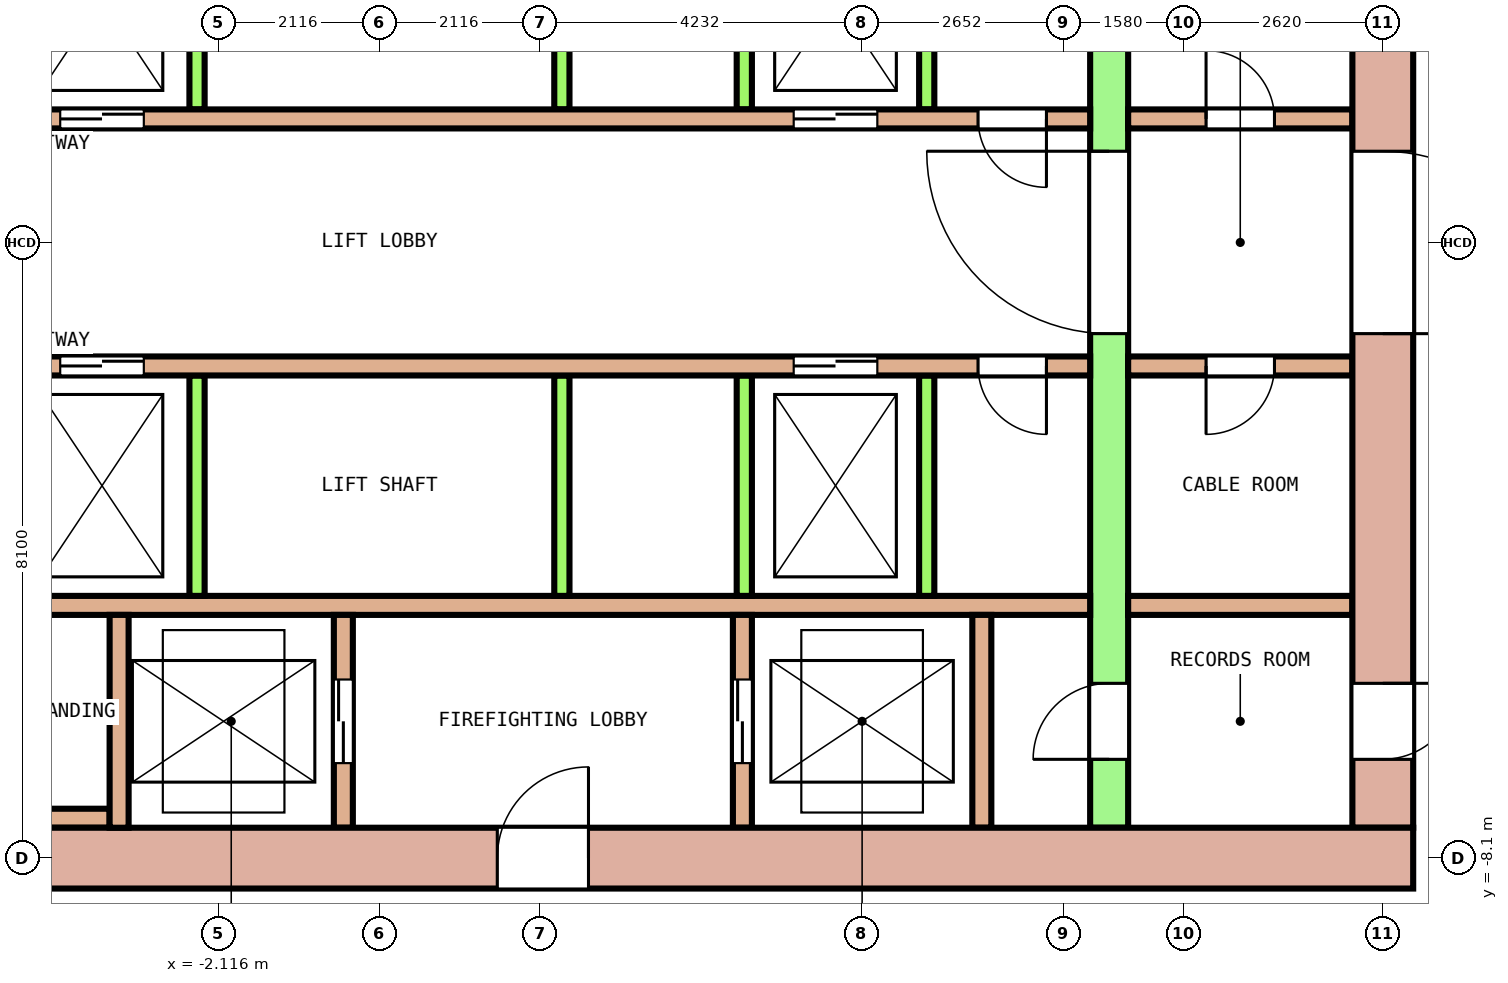
"""IFC4 building model, lengths in metres.
Left out: names, types, materials, properties, quantities, classifications, styles, units other than length and angle.
Written with IfcOpenShell. Run it as: python <this file> out.ifc"""

import sys

from ifc_helpers import new_model, si_unit, direction, frame, frame_2d, origin, place, context, subcontext, project, spatial, rectangle, extrude, element, fill, save


model = new_model("IFC4")
c1 = context("Model", 3, precision=1e-05, world=origin(), true_north=direction((0.0, 1.0)))
c2 = subcontext(c1, "Body", "Model", "MODEL_VIEW")
j1 = project(units=[si_unit("LENGTHUNIT", "METRE"), si_unit("PLANEANGLEUNIT", "RADIAN")], contexts=[c1])
p1 = place(None, origin())
s1 = spatial("IfcSite", under=j1, at=p1, CompositionType="ELEMENT")
p2 = place(p1, origin())
s2 = spatial("IfcBuilding", under=s1, at=p2, CompositionType="ELEMENT")
p3 = place(p2, frame((0.0, 0.0, 135.2)))
s3 = spatial("IfcBuildingStorey", under=s2, at=p3, CompositionType="ELEMENT", Elevation=135.2)
p4 = place(p3, frame((-13.6, -8.1, 0.0), z_axis=(0.0, 0.0, 1.0), x_axis=(1.0, 0.0, 0.0)))
e1 = element("IfcWall", 1, at=p4, inside=s3, PredefinedType="SHEAR", context=c2, shape_type="SweptSolid", body=[
    extrude(rectangle(XDim=27.2, YDim=0.8, at=frame_2d((13.6, 0.0))), origin(), (0.0, 0.0, 1.0), 4.1),
])
p5 = place(p4, frame((15.15, 0.0, 0.0)))
e2 = element("IfcOpeningElement", 2, at=p5, cuts=e1, PredefinedType="OPENING", context=c2, shape_type="SweptSolid", body=[
    extrude(rectangle(XDim=1.2, YDim=2.1, at=frame_2d((0.6, 1.05))), frame((0.0, 0.41, 0.0), z_axis=(0.0, -1.0, 0.0), x_axis=(1.0, 0.0, 0.0)), (0.0, 0.0, 1.0), 0.82),
])
p6 = place(p3, frame((13.2, -7.7, 0.0), z_axis=(0.0, 0.0, 1.0), x_axis=(0.0, 1.0, 0.0)))
e3 = element("IfcWall", 3, at=p6, inside=s3, PredefinedType="SHEAR", context=c2, shape_type="SweptSolid", body=[
    extrude(rectangle(XDim=15.4, YDim=0.8, at=frame_2d((7.7, 0.0))), origin(), (0.0, 0.0, 1.0), 4.1),
])
p7 = place(p6, frame((6.5, 0.0, 0.0)))
e4 = element("IfcOpeningElement", 4, at=p7, cuts=e3, PredefinedType="OPENING", context=c2, shape_type="SweptSolid", body=[
    extrude(rectangle(XDim=2.4, YDim=2.1, at=frame_2d((1.2, 1.05))), frame((0.0, 0.41, 0.0), z_axis=(0.0, -1.0, 0.0), x_axis=(1.0, 0.0, 0.0)), (0.0, 0.0, 1.0), 0.82),
])
p8 = place(p6, frame((13.4, 0.0, 0.0)))
e5 = element("IfcOpeningElement", 5, at=p8, cuts=e3, PredefinedType="OPENING", context=c2, shape_type="SweptSolid", body=[
    extrude(rectangle(XDim=1.2, YDim=2.1, at=frame_2d((0.6, 1.05))), frame((0.0, 0.41, 0.0), z_axis=(0.0, -1.0, 0.0), x_axis=(1.0, 0.0, 0.0)), (0.0, 0.0, 1.0), 0.82),
])
p9 = place(p6, frame((0.9, 0.0, 0.0)))
e6 = element("IfcOpeningElement", 6, at=p9, cuts=e3, PredefinedType="OPENING", context=c2, shape_type="SweptSolid", body=[
    extrude(rectangle(XDim=1.0, YDim=2.1, at=frame_2d((0.5, 1.05))), frame((0.0, 0.41, 0.0), z_axis=(0.0, -1.0, 0.0), x_axis=(1.0, 0.0, 0.0)), (0.0, 0.0, 1.0), 0.82),
])
p10 = place(p3, frame((9.6, -7.7, 0.0), z_axis=(0.0, 0.0, 1.0), x_axis=(0.0, 1.0, 0.0)))
e7 = element("IfcWall", 7, at=p10, inside=s3, PredefinedType="SHEAR", context=c2, shape_type="SweptSolid", body=[
    extrude(rectangle(XDim=15.4, YDim=0.5, at=frame_2d((7.7, 0.0))), origin(), (0.0, 0.0, 1.0), 4.1),
])
p11 = place(p10, frame((6.5, 0.0, 0.0)))
e8 = element("IfcOpeningElement", 8, at=p11, cuts=e7, PredefinedType="OPENING", context=c2, shape_type="SweptSolid", body=[
    extrude(rectangle(XDim=2.4, YDim=2.1, at=frame_2d((1.2, 1.05))), frame((0.0, 0.26, 0.0), z_axis=(0.0, -1.0, 0.0), x_axis=(1.0, 0.0, 0.0)), (0.0, 0.0, 1.0), 0.52),
])
p12 = place(p10, frame((13.4, 0.0, 0.0)))
e9 = element("IfcOpeningElement", 9, at=p12, cuts=e7, PredefinedType="OPENING", context=c2, shape_type="SweptSolid", body=[
    extrude(rectangle(XDim=1.2, YDim=2.1, at=frame_2d((0.6, 1.05))), frame((0.0, 0.26, 0.0), z_axis=(0.0, -1.0, 0.0), x_axis=(1.0, 0.0, 0.0)), (0.0, 0.0, 1.0), 0.52),
])
p13 = place(p10, frame((0.9, 0.0, 0.0)))
e10 = element("IfcOpeningElement", 10, at=p13, cuts=e7, PredefinedType="OPENING", context=c2, shape_type="SweptSolid", body=[
    extrude(rectangle(XDim=1.0, YDim=2.1, at=frame_2d((0.5, 1.05))), frame((0.0, 0.26, 0.0), z_axis=(0.0, -1.0, 0.0), x_axis=(1.0, 0.0, 0.0)), (0.0, 0.0, 1.0), 0.52),
])
p14 = place(p3, frame((-9.35, 1.625, 0.0), z_axis=(0.0, 0.0, 1.0), x_axis=(1.0, 0.0, 0.0)))
e11 = element("IfcWall", 11, at=p14, inside=s3, PredefinedType="SOLIDWALL", context=c2, shape_type="SweptSolid", body=[
    extrude(rectangle(XDim=18.7, YDim=0.25, at=frame_2d((9.35, 0.0))), origin(), (0.0, 0.0, 1.0), 4.1),
])
p15 = place(p14, frame((2.85, 0.0, 0.0)))
e12 = element("IfcOpeningElement", 12, at=p15, cuts=e11, PredefinedType="OPENING", context=c2, shape_type="SweptSolid", body=[
    extrude(rectangle(XDim=1.1, YDim=2.1, at=frame_2d((0.55, 1.05))), frame((0.0, 0.135, 0.0), z_axis=(0.0, -1.0, 0.0), x_axis=(1.0, 0.0, 0.0)), (0.0, 0.0, 1.0), 0.27),
])
p16 = place(p14, frame((5.15, 0.0, 0.0)))
e13 = element("IfcOpeningElement", 13, at=p16, cuts=e11, PredefinedType="OPENING", context=c2, shape_type="SweptSolid", body=[
    extrude(rectangle(XDim=1.1, YDim=2.1, at=frame_2d((0.55, 1.05))), frame((0.0, 0.135, 0.0), z_axis=(0.0, -1.0, 0.0), x_axis=(1.0, 0.0, 0.0)), (0.0, 0.0, 1.0), 0.27),
])
p17 = place(p14, frame((14.8, 0.0, 0.0)))
e14 = element("IfcOpeningElement", 14, at=p17, cuts=e11, PredefinedType="OPENING", context=c2, shape_type="SweptSolid", body=[
    extrude(rectangle(XDim=1.1, YDim=2.1, at=frame_2d((0.55, 1.05))), frame((0.0, 0.135, 0.0), z_axis=(0.0, -1.0, 0.0), x_axis=(1.0, 0.0, 0.0)), (0.0, 0.0, 1.0), 0.27),
])
p18 = place(p14, frame((0.575, 0.0, 0.0)))
e15 = element("IfcOpeningElement", 15, at=p18, cuts=e11, PredefinedType="OPENING", context=c2, shape_type="SweptSolid", body=[
    extrude(rectangle(XDim=0.9, YDim=2.1, at=frame_2d((0.45, 1.05))), frame((0.0, 0.135, 0.0), z_axis=(0.0, -1.0, 0.0), x_axis=(1.0, 0.0, 0.0)), (0.0, 0.0, 1.0), 0.27),
])
p19 = place(p14, frame((17.225, 0.0, 0.0)))
e16 = element("IfcOpeningElement", 16, at=p19, cuts=e11, PredefinedType="OPENING", context=c2, shape_type="SweptSolid", body=[
    extrude(rectangle(XDim=0.9, YDim=2.1, at=frame_2d((0.45, 1.05))), frame((0.0, 0.135, 0.0), z_axis=(0.0, -1.0, 0.0), x_axis=(1.0, 0.0, 0.0)), (0.0, 0.0, 1.0), 0.27),
])
p20 = place(p3, frame((9.85, 1.625, 0.0), z_axis=(0.0, 0.0, 1.0), x_axis=(1.0, 0.0, 0.0)))
e17 = element("IfcWall", 17, at=p20, inside=s3, PredefinedType="SOLIDWALL", context=c2, shape_type="SweptSolid", body=[
    extrude(rectangle(XDim=2.95, YDim=0.25, at=frame_2d((1.475, 0.0))), origin(), (0.0, 0.0, 1.0), 4.1),
])
p21 = place(p20, frame((1.025, 0.0, 0.0)))
e18 = element("IfcOpeningElement", 18, at=p21, cuts=e17, PredefinedType="OPENING", context=c2, shape_type="SweptSolid", body=[
    extrude(rectangle(XDim=0.9, YDim=2.1, at=frame_2d((0.45, 1.05))), frame((0.0, 0.135, 0.0), z_axis=(0.0, -1.0, 0.0), x_axis=(1.0, 0.0, 0.0)), (0.0, 0.0, 1.0), 0.27),
])
for number, where, z_axis, x_axis in (
    (19, (-2.4, 1.75, 0.0), (0.0, 0.0, 1.0), (0.0, 1.0, 0.0)),
    (20, (2.4, 1.75, 0.0), (0.0, 0.0, 1.0), (0.0, 1.0, 0.0)),
    (21, (4.8, 1.75, 0.0), (0.0, 0.0, 1.0), (0.0, 1.0, 0.0)),
    (22, (7.2, 1.75, 0.0), (0.0, 0.0, 1.0), (0.0, 1.0, 0.0)),
):
    element("IfcWall", number, at=place(p3, frame(where, z_axis=z_axis, x_axis=x_axis)), inside=s3, PredefinedType="SOLIDWALL", context=c2, shape_type="SweptSolid", body=[
        extrude(rectangle(XDim=2.9, YDim=0.2, at=frame_2d((1.45, 0.0))), origin(), (0.0, 0.0, 1.0), 4.1),
    ])
p22 = place(p3, frame((-9.35, -1.625, 0.0), z_axis=(0.0, 0.0, 1.0), x_axis=(1.0, 0.0, 0.0)))
e23 = element("IfcWall", 23, at=p22, inside=s3, PredefinedType="SOLIDWALL", context=c2, shape_type="SweptSolid", body=[
    extrude(rectangle(XDim=18.7, YDim=0.25, at=frame_2d((9.35, 0.0))), origin(), (0.0, 0.0, 1.0), 4.1),
])
p23 = place(p22, frame((2.85, 0.0, 0.0)))
e24 = element("IfcOpeningElement", 24, at=p23, cuts=e23, PredefinedType="OPENING", context=c2, shape_type="SweptSolid", body=[
    extrude(rectangle(XDim=1.1, YDim=2.1, at=frame_2d((0.55, 1.05))), frame((0.0, 0.135, 0.0), z_axis=(0.0, -1.0, 0.0), x_axis=(1.0, 0.0, 0.0)), (0.0, 0.0, 1.0), 0.27),
])
p24 = place(p22, frame((5.15, 0.0, 0.0)))
e25 = element("IfcOpeningElement", 25, at=p24, cuts=e23, PredefinedType="OPENING", context=c2, shape_type="SweptSolid", body=[
    extrude(rectangle(XDim=1.1, YDim=2.1, at=frame_2d((0.55, 1.05))), frame((0.0, 0.135, 0.0), z_axis=(0.0, -1.0, 0.0), x_axis=(1.0, 0.0, 0.0)), (0.0, 0.0, 1.0), 0.27),
])
p25 = place(p22, frame((14.8, 0.0, 0.0)))
e26 = element("IfcOpeningElement", 26, at=p25, cuts=e23, PredefinedType="OPENING", context=c2, shape_type="SweptSolid", body=[
    extrude(rectangle(XDim=1.1, YDim=2.1, at=frame_2d((0.55, 1.05))), frame((0.0, 0.135, 0.0), z_axis=(0.0, -1.0, 0.0), x_axis=(1.0, 0.0, 0.0)), (0.0, 0.0, 1.0), 0.27),
])
p26 = place(p22, frame((0.575, 0.0, 0.0)))
e27 = element("IfcOpeningElement", 27, at=p26, cuts=e23, PredefinedType="OPENING", context=c2, shape_type="SweptSolid", body=[
    extrude(rectangle(XDim=0.9, YDim=2.1, at=frame_2d((0.45, 1.05))), frame((0.0, 0.135, 0.0), z_axis=(0.0, -1.0, 0.0), x_axis=(1.0, 0.0, 0.0)), (0.0, 0.0, 1.0), 0.27),
])
p27 = place(p22, frame((17.225, 0.0, 0.0)))
e28 = element("IfcOpeningElement", 28, at=p27, cuts=e23, PredefinedType="OPENING", context=c2, shape_type="SweptSolid", body=[
    extrude(rectangle(XDim=0.9, YDim=2.1, at=frame_2d((0.45, 1.05))), frame((0.0, 0.135, 0.0), z_axis=(0.0, -1.0, 0.0), x_axis=(1.0, 0.0, 0.0)), (0.0, 0.0, 1.0), 0.27),
])
p28 = place(p3, frame((9.85, -1.625, 0.0), z_axis=(0.0, 0.0, 1.0), x_axis=(1.0, 0.0, 0.0)))
e29 = element("IfcWall", 29, at=p28, inside=s3, PredefinedType="SOLIDWALL", context=c2, shape_type="SweptSolid", body=[
    extrude(rectangle(XDim=2.95, YDim=0.25, at=frame_2d((1.475, 0.0))), origin(), (0.0, 0.0, 1.0), 4.1),
])
p29 = place(p28, frame((1.025, 0.0, 0.0)))
e30 = element("IfcOpeningElement", 30, at=p29, cuts=e29, PredefinedType="OPENING", context=c2, shape_type="SweptSolid", body=[
    extrude(rectangle(XDim=0.9, YDim=2.1, at=frame_2d((0.45, 1.05))), frame((0.0, 0.135, 0.0), z_axis=(0.0, -1.0, 0.0), x_axis=(1.0, 0.0, 0.0)), (0.0, 0.0, 1.0), 0.27),
])
p30 = place(p3, frame((-9.35, -4.775, 0.0), z_axis=(0.0, 0.0, 1.0), x_axis=(1.0, 0.0, 0.0)))
e31 = element("IfcWall", 31, at=p30, inside=s3, PredefinedType="SOLIDWALL", context=c2, shape_type="SweptSolid", body=[
    extrude(rectangle(XDim=18.7, YDim=0.25, at=frame_2d((9.35, 0.0))), origin(), (0.0, 0.0, 1.0), 4.1),
])
p31 = place(p3, frame((9.85, -4.775, 0.0), z_axis=(0.0, 0.0, 1.0), x_axis=(1.0, 0.0, 0.0)))
e32 = element("IfcWall", 32, at=p31, inside=s3, PredefinedType="SOLIDWALL", context=c2, shape_type="SweptSolid", body=[
    extrude(rectangle(XDim=2.95, YDim=0.25, at=frame_2d((1.475, 0.0))), origin(), (0.0, 0.0, 1.0), 4.1),
])
for number, where, z_axis, x_axis in (
    (33, (-2.4, -4.65, 0.0), (0.0, 0.0, 1.0), (0.0, 1.0, 0.0)),
    (34, (2.4, -4.65, 0.0), (0.0, 0.0, 1.0), (0.0, 1.0, 0.0)),
    (35, (4.8, -4.65, 0.0), (0.0, 0.0, 1.0), (0.0, 1.0, 0.0)),
    (36, (7.2, -4.65, 0.0), (0.0, 0.0, 1.0), (0.0, 1.0, 0.0)),
):
    element("IfcWall", number, at=place(p3, frame(where, z_axis=z_axis, x_axis=x_axis)), inside=s3, PredefinedType="SOLIDWALL", context=c2, shape_type="SweptSolid", body=[
        extrude(rectangle(XDim=2.9, YDim=0.2, at=frame_2d((1.45, 0.0))), origin(), (0.0, 0.0, 1.0), 4.1),
    ])
p32 = place(p3, frame((-9.35, -7.575, 0.0), z_axis=(0.0, 0.0, 1.0), x_axis=(1.0, 0.0, 0.0)))
e37 = element("IfcWall", 37, at=p32, inside=s3, PredefinedType="SOLIDWALL", context=c2, shape_type="SweptSolid", body=[
    extrude(rectangle(XDim=5.8, YDim=0.25, at=frame_2d((2.9, 0.0))), origin(), (0.0, 0.0, 1.0), 4.1),
])
p33 = place(p3, frame((-3.425, -7.7, 0.0), z_axis=(0.0, 0.0, 1.0), x_axis=(0.0, 1.0, 0.0)))
e38 = element("IfcWall", 38, at=p33, inside=s3, PredefinedType="SOLIDWALL", context=c2, shape_type="SweptSolid", body=[
    extrude(rectangle(XDim=2.8, YDim=0.25, at=frame_2d((1.4, 0.0))), origin(), (0.0, 0.0, 1.0), 4.1),
])
p34 = place(p3, frame((-0.475, -7.7, 0.0), z_axis=(0.0, 0.0, 1.0), x_axis=(0.0, 1.0, 0.0)))
e39 = element("IfcWall", 39, at=p34, inside=s3, PredefinedType="SOLIDWALL", context=c2, shape_type="SweptSolid", body=[
    extrude(rectangle(XDim=2.8, YDim=0.25, at=frame_2d((1.4, 0.0))), origin(), (0.0, 0.0, 1.0), 4.1),
])
p35 = place(p34, frame((0.85, 0.0, 0.0)))
e40 = element("IfcOpeningElement", 40, at=p35, cuts=e39, PredefinedType="OPENING", context=c2, shape_type="SweptSolid", body=[
    extrude(rectangle(XDim=1.1, YDim=2.1, at=frame_2d((0.55, 1.05))), frame((0.0, 0.135, 0.0), z_axis=(0.0, -1.0, 0.0), x_axis=(1.0, 0.0, 0.0)), (0.0, 0.0, 1.0), 0.27),
])
p36 = place(p3, frame((4.775, -7.7, 0.0), z_axis=(0.0, 0.0, 1.0), x_axis=(0.0, 1.0, 0.0)))
e41 = element("IfcWall", 41, at=p36, inside=s3, PredefinedType="SOLIDWALL", context=c2, shape_type="SweptSolid", body=[
    extrude(rectangle(XDim=2.8, YDim=0.25, at=frame_2d((1.4, 0.0))), origin(), (0.0, 0.0, 1.0), 4.1),
])
p37 = place(p36, frame((0.85, 0.0, 0.0)))
e42 = element("IfcOpeningElement", 42, at=p37, cuts=e41, PredefinedType="OPENING", context=c2, shape_type="SweptSolid", body=[
    extrude(rectangle(XDim=1.1, YDim=2.1, at=frame_2d((0.55, 1.05))), frame((0.0, 0.135, 0.0), z_axis=(0.0, -1.0, 0.0), x_axis=(1.0, 0.0, 0.0)), (0.0, 0.0, 1.0), 0.27),
])
p38 = place(p3, frame((7.925, -7.7, 0.0), z_axis=(0.0, 0.0, 1.0), x_axis=(0.0, 1.0, 0.0)))
e43 = element("IfcWall", 43, at=p38, inside=s3, PredefinedType="SOLIDWALL", context=c2, shape_type="SweptSolid", body=[
    extrude(rectangle(XDim=2.8, YDim=0.25, at=frame_2d((1.4, 0.0))), origin(), (0.0, 0.0, 1.0), 4.1),
])
p39 = place(p16, origin())
e44 = element("IfcDoor", 44, at=p39, inside=s3, OperationType="DOUBLE_DOOR_SLIDING", PredefinedType="DOOR", context=c2, shape_type="SweptSolid", body=[
    extrude(rectangle(XDim=1.1, YDim=2.1, at=frame_2d((0.55, 1.05))), frame((0.0, 0.075, 0.0), z_axis=(0.0, -1.0, 0.0), x_axis=(1.0, 0.0, 0.0)), (0.0, 0.0, 1.0), 0.15),
])
fill(e13, e44)
p40 = place(p17, origin())
e45 = element("IfcDoor", 45, at=p40, inside=s3, OperationType="DOUBLE_DOOR_SLIDING", PredefinedType="DOOR", context=c2, shape_type="SweptSolid", body=[
    extrude(rectangle(XDim=1.1, YDim=2.1, at=frame_2d((0.55, 1.05))), frame((0.0, 0.075, 0.0), z_axis=(0.0, -1.0, 0.0), x_axis=(1.0, 0.0, 0.0)), (0.0, 0.0, 1.0), 0.15),
])
fill(e14, e45)
p41 = place(p24, origin())
e46 = element("IfcDoor", 46, at=p41, inside=s3, OperationType="DOUBLE_DOOR_SLIDING", PredefinedType="DOOR", context=c2, shape_type="SweptSolid", body=[
    extrude(rectangle(XDim=1.1, YDim=2.1, at=frame_2d((0.55, 1.05))), frame((0.0, 0.075, 0.0), z_axis=(0.0, -1.0, 0.0), x_axis=(1.0, 0.0, 0.0)), (0.0, 0.0, 1.0), 0.15),
])
fill(e25, e46)
p42 = place(p25, origin())
e47 = element("IfcDoor", 47, at=p42, inside=s3, OperationType="DOUBLE_DOOR_SLIDING", PredefinedType="DOOR", context=c2, shape_type="SweptSolid", body=[
    extrude(rectangle(XDim=1.1, YDim=2.1, at=frame_2d((0.55, 1.05))), frame((0.0, 0.075, 0.0), z_axis=(0.0, -1.0, 0.0), x_axis=(1.0, 0.0, 0.0)), (0.0, 0.0, 1.0), 0.15),
])
fill(e26, e47)
p43 = place(p35, origin())
e48 = element("IfcDoor", 48, at=p43, inside=s3, OperationType="DOUBLE_DOOR_SLIDING", PredefinedType="DOOR", context=c2, shape_type="SweptSolid", body=[
    extrude(rectangle(XDim=1.1, YDim=2.1, at=frame_2d((0.55, 1.05))), frame((0.0, 0.075, 0.0), z_axis=(0.0, -1.0, 0.0), x_axis=(1.0, 0.0, 0.0)), (0.0, 0.0, 1.0), 0.15),
])
fill(e40, e48)
p44 = place(p37, origin())
e49 = element("IfcDoor", 49, at=p44, inside=s3, OperationType="DOUBLE_DOOR_SLIDING", PredefinedType="DOOR", context=c2, shape_type="SweptSolid", body=[
    extrude(rectangle(XDim=1.1, YDim=2.1, at=frame_2d((0.55, 1.05))), frame((0.0, 0.075, 0.0), z_axis=(0.0, -1.0, 0.0), x_axis=(1.0, 0.0, 0.0)), (0.0, 0.0, 1.0), 0.15),
])
fill(e42, e49)
p45 = place(p11, origin())
e50 = element("IfcDoor", 50, at=p45, inside=s3, OperationType="DOUBLE_DOOR_SINGLE_SWING", PredefinedType="DOOR", context=c2, shape_type="SweptSolid", body=[
    extrude(rectangle(XDim=2.4, YDim=2.1, at=frame_2d((1.2, 1.05))), frame((0.0, 0.2, 0.0), z_axis=(0.0, -1.0, 0.0), x_axis=(1.0, 0.0, 0.0)), (0.0, 0.0, 1.0), 0.4),
])
fill(e8, e50)
p46 = place(p7, origin())
e51 = element("IfcDoor", 51, at=p46, inside=s3, OperationType="DOUBLE_DOOR_SINGLE_SWING", PredefinedType="DOOR", context=c2, shape_type="SweptSolid", body=[
    extrude(rectangle(XDim=2.4, YDim=2.1, at=frame_2d((1.2, 1.05))), frame((0.0, 0.3, 0.0), z_axis=(0.0, -1.0, 0.0), x_axis=(1.0, 0.0, 0.0)), (0.0, 0.0, 1.0), 0.6),
])
fill(e4, e51)
p47 = place(p5, origin())
e52 = element("IfcDoor", 52, at=p47, inside=s3, OperationType="SINGLE_SWING_RIGHT", PredefinedType="DOOR", context=c2, shape_type="SweptSolid", body=[
    extrude(rectangle(XDim=1.2, YDim=2.1, at=frame_2d((0.6, 1.05))), frame((0.0, 0.3, 0.0), z_axis=(0.0, -1.0, 0.0), x_axis=(1.0, 0.0, 0.0)), (0.0, 0.0, 1.0), 0.6),
])
fill(e2, e52)
p48 = place(p13, origin())
e53 = element("IfcDoor", 53, at=p48, inside=s3, OperationType="SINGLE_SWING_RIGHT", PredefinedType="DOOR", context=c2, shape_type="SweptSolid", body=[
    extrude(rectangle(XDim=1.0, YDim=2.1, at=frame_2d((0.5, 1.05))), frame((0.0, 0.2, 0.0), z_axis=(0.0, -1.0, 0.0), x_axis=(1.0, 0.0, 0.0)), (0.0, 0.0, 1.0), 0.4),
])
fill(e10, e53)
p49 = place(p9, origin())
e54 = element("IfcDoor", 54, at=p49, inside=s3, OperationType="SINGLE_SWING_LEFT", PredefinedType="DOOR", context=c2, shape_type="SweptSolid", body=[
    extrude(rectangle(XDim=1.0, YDim=2.1, at=frame_2d((0.5, 1.05))), frame((0.0, 0.3, 0.0), z_axis=(0.0, -1.0, 0.0), x_axis=(1.0, 0.0, 0.0)), (0.0, 0.0, 1.0), 0.6),
])
fill(e6, e54)
p50 = place(p19, origin())
e55 = element("IfcDoor", 55, at=p50, inside=s3, OperationType="SINGLE_SWING_RIGHT", PredefinedType="DOOR", context=c2, shape_type="SweptSolid", body=[
    extrude(rectangle(XDim=0.9, YDim=2.1, at=frame_2d((0.45, 1.05))), frame((0.0, 0.075, 0.0), z_axis=(0.0, -1.0, 0.0), x_axis=(1.0, 0.0, 0.0)), (0.0, 0.0, 1.0), 0.15),
])
fill(e16, e55)
p51 = place(p21, origin())
e56 = element("IfcDoor", 56, at=p51, inside=s3, OperationType="SINGLE_SWING_LEFT", PredefinedType="DOOR", context=c2, shape_type="SweptSolid", body=[
    extrude(rectangle(XDim=0.9, YDim=2.1, at=frame_2d((0.45, 1.05))), frame((0.0, 0.075, 0.0), z_axis=(0.0, -1.0, 0.0), x_axis=(1.0, 0.0, 0.0)), (0.0, 0.0, 1.0), 0.15),
])
fill(e18, e56)
p52 = place(p27, origin())
e57 = element("IfcDoor", 57, at=p52, inside=s3, OperationType="SINGLE_SWING_RIGHT", PredefinedType="DOOR", context=c2, shape_type="SweptSolid", body=[
    extrude(rectangle(XDim=0.9, YDim=2.1, at=frame_2d((0.45, 1.05))), frame((0.0, 0.075, 0.0), z_axis=(0.0, -1.0, 0.0), x_axis=(1.0, 0.0, 0.0)), (0.0, 0.0, 1.0), 0.15),
])
fill(e28, e57)
p53 = place(p29, origin())
e58 = element("IfcDoor", 58, at=p53, inside=s3, OperationType="SINGLE_SWING_LEFT", PredefinedType="DOOR", context=c2, shape_type="SweptSolid", body=[
    extrude(rectangle(XDim=0.9, YDim=2.1, at=frame_2d((0.45, 1.05))), frame((0.0, 0.075, 0.0), z_axis=(0.0, -1.0, 0.0), x_axis=(1.0, 0.0, 0.0)), (0.0, 0.0, 1.0), 0.15),
])
fill(e30, e58)
save(model, sys.argv[1])
